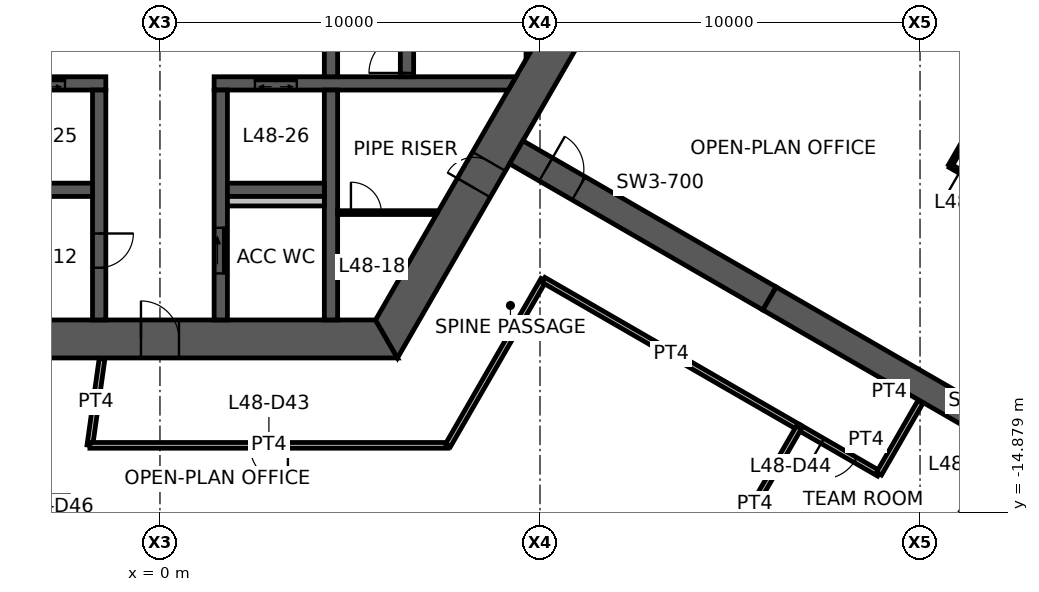
"""IFC4 building model, lengths in metres.
Left out: names, types, materials, properties, quantities, classifications, styles, units other than length and angle.
Written with IfcOpenShell. Run it as: python <this file> out.ifc"""

import sys

from ifc_helpers import new_model, si_unit, direction, frame, frame_2d, origin, place, context, subcontext, project, spatial, polyline, rectangle, outline, extrude, element, fill, save


model = new_model("IFC4")
c1 = context("Model", 3, precision=1e-05, world=origin(), true_north=direction((0.0, 1.0)))
c2 = subcontext(c1, "Body", "Model", "MODEL_VIEW")
j1 = project(units=[si_unit("LENGTHUNIT", "METRE"), si_unit("PLANEANGLEUNIT", "RADIAN")], contexts=[c1])
p1 = place(None, origin())
s1 = spatial("IfcSite", under=j1, at=p1, CompositionType="ELEMENT")
p2 = place(p1, origin())
s2 = spatial("IfcBuilding", under=s1, at=p2, CompositionType="ELEMENT")
p3 = place(p2, frame((0.0, 0.0, 191.6)))
s3 = spatial("IfcBuildingStorey", under=s2, at=p3, CompositionType="ELEMENT", Elevation=191.6)
p4 = place(p3, frame((-5.961, -10.325, 0.0), z_axis=(0.0, 0.0, 1.0), x_axis=(1.0, 0.0, 0.0)))
e1 = element("IfcWall", 1, at=p4, inside=s3, PredefinedType="SHEAR", context=c2, shape_type="SweptSolid", body=[
    extrude(outline(polyline([(-0.289, -0.5), (5.461, -0.5), (6.461, -0.5), (12.211, -0.5), (11.634, 0.5), (6.461, 0.5), (5.461, 0.5), (0.289, 0.5), (-0.289, -0.5)])), origin(), (0.0, 0.0, 1.0), 3.9),
])
p5 = place(p4, frame((5.461, 0.0, 0.0)))
e2 = element("IfcOpeningElement", 2, at=p5, cuts=e1, PredefinedType="OPENING", context=c2, shape_type="SweptSolid", body=[
    extrude(rectangle(XDim=1.0, YDim=2.1, at=frame_2d((0.5, 1.05))), frame((0.0, 0.51, 0.0), z_axis=(0.0, -1.0, 0.0), x_axis=(1.0, 0.0, 0.0)), (0.0, 0.0, 1.0), 1.02),
])
p6 = place(p3, frame((5.961, -10.325, 0.0), z_axis=(0.0, 0.0, 1.0), x_axis=(0.500004296715, 0.866022923061, 0.0)))
e3 = element("IfcWall", 3, at=p6, inside=s3, PredefinedType="SHEAR", context=c2, shape_type="SweptSolid", body=[
    extrude(outline(polyline([(-0.289, -0.5), (4.594, -0.5), (5.394, -0.5), (12.211, -0.5), (11.634, 0.5), (5.394, 0.5), (4.594, 0.5), (0.289, 0.5), (-0.289, -0.5)])), origin(), (0.0, 0.0, 1.0), 3.9),
])
p7 = place(p6, frame((4.594, 0.0, 0.0)))
e4 = element("IfcOpeningElement", 4, at=p7, cuts=e3, PredefinedType="OPENING", context=c2, shape_type="SweptSolid", body=[
    extrude(rectangle(XDim=0.8, YDim=2.1, at=frame_2d((0.4, 1.05))), frame((0.0, 0.51, 0.0), z_axis=(0.0, -1.0, 0.0), x_axis=(1.0, 0.0, 0.0)), (0.0, 0.0, 1.0), 1.02),
])
p8 = place(p3, frame((9.375, -5.413, 0.0), z_axis=(0.0, 0.0, 1.0), x_axis=(0.866032377459, -0.499987921047, 0.0)))
e5 = element("IfcWall", 5, at=p8, inside=s3, PredefinedType="SHEAR", context=c2, shape_type="SweptSolid", body=[
    extrude(rectangle(XDim=7.696, YDim=0.7, at=frame_2d((3.848, 0.0))), origin(), (0.0, 0.0, 1.0), 3.9),
])
p9 = place(p8, frame((0.9, 0.0, 0.0)))
e6 = element("IfcOpeningElement", 6, at=p9, cuts=e5, PredefinedType="OPENING", context=c2, shape_type="SweptSolid", body=[
    extrude(rectangle(XDim=1.0, YDim=2.1, at=frame_2d((0.5, 1.05))), frame((0.0, 0.36, 0.0), z_axis=(0.0, -1.0, 0.0), x_axis=(1.0, 0.0, 0.0)), (0.0, 0.0, 1.0), 0.72),
])
p10 = place(p3, frame((16.039, -9.26, 0.0), z_axis=(0.0, 0.0, 1.0), x_axis=(0.866024837091, -0.50000098154, 0.0)))
e7 = element("IfcWall", 7, at=p10, inside=s3, PredefinedType="SHEAR", context=c2, shape_type="SweptSolid", body=[
    extrude(rectangle(XDim=13.0, YDim=0.7, at=frame_2d((6.5, 0.0))), origin(), (0.0, 0.0, 1.0), 3.9),
])
p11 = place(p3, frame((-9.266, -3.6, 0.0), z_axis=(0.0, 0.0, 1.0), x_axis=(1.0, 0.0, 0.0)))
e8 = element("IfcWall", 8, at=p11, inside=s3, PredefinedType="SHEAR", context=c2, shape_type="SweptSolid", body=[
    extrude(outline(polyline([(0.101, -0.175), (3.116, -0.175), (4.417, -0.175), (5.667, -0.175), (6.767, -0.175), (7.841, -0.175), (7.841, 0.175), (6.767, 0.175), (5.667, 0.175), (4.417, 0.175), (3.116, 0.175), (-0.101, 0.175), (0.101, -0.175)])), origin(), (0.0, 0.0, 1.0), 3.9),
])
p12 = place(p11, frame((5.667, 0.0, 0.0)))
e9 = element("IfcOpeningElement", 9, at=p12, cuts=e8, PredefinedType="OPENING", context=c2, shape_type="SweptSolid", body=[
    extrude(rectangle(XDim=1.1, YDim=2.1, at=frame_2d((0.55, 1.05))), frame((0.0, 0.185, 0.0), z_axis=(0.0, -1.0, 0.0), x_axis=(1.0, 0.0, 0.0)), (0.0, 0.0, 1.0), 0.37),
])
p13 = place(p11, frame((3.116, 0.0, 0.0)))
e10 = element("IfcOpeningElement", 10, at=p13, cuts=e8, PredefinedType="OPENING", context=c2, shape_type="SweptSolid", body=[
    extrude(rectangle(XDim=1.3, YDim=2.1, at=frame_2d((0.65, 1.05))), frame((0.0, 0.185, 0.0), z_axis=(0.0, -1.0, 0.0), x_axis=(1.0, 0.0, 0.0)), (0.0, 0.0, 1.0), 0.37),
])
p14 = place(p3, frame((1.425, -3.6, 0.0), z_axis=(0.0, 0.0, 1.0), x_axis=(1.0, 0.0, 0.0)))
e11 = element("IfcWall", 11, at=p14, inside=s3, PredefinedType="SHEAR", context=c2, shape_type="SweptSolid", body=[
    extrude(outline(polyline([(0.0, -0.175), (1.075, -0.175), (2.175, -0.175), (7.74, -0.175), (7.942, 0.175), (2.175, 0.175), (1.075, 0.175), (0.0, 0.175), (0.0, -0.175)])), origin(), (0.0, 0.0, 1.0), 3.9),
])
p15 = place(p14, frame((1.075, 0.0, 0.0)))
e12 = element("IfcOpeningElement", 12, at=p15, cuts=e11, PredefinedType="OPENING", context=c2, shape_type="SweptSolid", body=[
    extrude(rectangle(XDim=1.1, YDim=2.1, at=frame_2d((0.55, 1.05))), frame((0.0, 0.185, 0.0), z_axis=(0.0, -1.0, 0.0), x_axis=(1.0, 0.0, 0.0)), (0.0, 0.0, 1.0), 0.37),
])
p16 = place(p3, frame((-1.6, -3.775, 0.0), z_axis=(0.0, 0.0, 1.0), x_axis=(0.0, -1.0, 0.0)))
e13 = element("IfcWall", 13, at=p16, inside=s3, PredefinedType="SHEAR", context=c2, shape_type="SweptSolid", body=[
    extrude(rectangle(XDim=6.05, YDim=0.35, at=frame_2d((3.025, 0.0))), origin(), (0.0, 0.0, 1.0), 3.9),
])
p17 = place(p16, frame((3.775, 0.0, 0.0)))
e14 = element("IfcOpeningElement", 14, at=p17, cuts=e13, PredefinedType="OPENING", context=c2, shape_type="SweptSolid", body=[
    extrude(rectangle(XDim=0.9, YDim=2.1, at=frame_2d((0.45, 1.05))), frame((0.0, 0.185, 0.0), z_axis=(0.0, -1.0, 0.0), x_axis=(1.0, 0.0, 0.0)), (0.0, 0.0, 1.0), 0.37),
])
p18 = place(p3, frame((1.6, -3.775, 0.0), z_axis=(0.0, 0.0, 1.0), x_axis=(0.0, -1.0, 0.0)))
e15 = element("IfcWall", 15, at=p18, inside=s3, PredefinedType="SHEAR", context=c2, shape_type="SweptSolid", body=[
    extrude(rectangle(XDim=6.05, YDim=0.35, at=frame_2d((3.025, 0.0))), origin(), (0.0, 0.0, 1.0), 3.9),
])
p19 = place(p18, frame((3.625, 0.0, 0.0)))
e16 = element("IfcOpeningElement", 16, at=p19, cuts=e15, PredefinedType="OPENING", context=c2, shape_type="SweptSolid", body=[
    extrude(rectangle(XDim=1.2, YDim=2.1, at=frame_2d((0.6, 1.05))), frame((0.0, 0.185, 0.0), z_axis=(0.0, -1.0, 0.0), x_axis=(1.0, 0.0, 0.0)), (0.0, 0.0, 1.0), 0.37),
])
p20 = place(p3, frame((4.5, -3.425, 0.0), z_axis=(0.0, 0.0, 1.0), x_axis=(0.0, 1.0, 0.0)))
e17 = element("IfcWall", 17, at=p20, inside=s3, PredefinedType="SHEAR", context=c2, shape_type="SweptSolid", body=[
    extrude(rectangle(XDim=6.85, YDim=0.35, at=frame_2d((3.425, 0.0))), origin(), (0.0, 0.0, 1.0), 3.9),
])
p21 = place(p20, frame((2.925, 0.0, 0.0)))
e18 = element("IfcOpeningElement", 18, at=p21, cuts=e17, PredefinedType="OPENING", context=c2, shape_type="SweptSolid", body=[
    extrude(rectangle(XDim=1.0, YDim=2.1, at=frame_2d((0.5, 1.05))), frame((0.0, 0.185, 0.0), z_axis=(0.0, -1.0, 0.0), x_axis=(1.0, 0.0, 0.0)), (0.0, 0.0, 1.0), 0.37),
])
p22 = place(p3, frame((6.5, -3.425, 0.0), z_axis=(0.0, 0.0, 1.0), x_axis=(0.0, 1.0, 0.0)))
e19 = element("IfcWall", 19, at=p22, inside=s3, PredefinedType="SHEAR", context=c2, shape_type="SweptSolid", body=[
    extrude(rectangle(XDim=6.85, YDim=0.35, at=frame_2d((3.425, 0.0))), origin(), (0.0, 0.0, 1.0), 3.9),
])
p23 = place(p22, frame((0.1, 0.0, 0.0)))
e20 = element("IfcOpeningElement", 20, at=p23, cuts=e19, PredefinedType="OPENING", context=c2, shape_type="SweptSolid", body=[
    extrude(rectangle(XDim=1.0, YDim=2.1, at=frame_2d((0.5, 1.05))), frame((0.0, 0.185, 0.0), z_axis=(0.0, -1.0, 0.0), x_axis=(1.0, 0.0, 0.0)), (0.0, 0.0, 1.0), 0.37),
])
p24 = place(p3, frame((4.5, -3.775, 0.0), z_axis=(0.0, 0.0, 1.0), x_axis=(0.0, -1.0, 0.0)))
e21 = element("IfcWall", 21, at=p24, inside=s3, PredefinedType="SHEAR", context=c2, shape_type="SweptSolid", body=[
    extrude(rectangle(XDim=6.05, YDim=0.35, at=frame_2d((3.025, 0.0))), origin(), (0.0, 0.0, 1.0), 3.9),
])
for number, where, z_axis, x_axis in (
    (22, (-4.325, -6.4, 0.0), (0.0, 0.0, 1.0), (1.0, 0.0, 0.0)),
    (23, (1.775, -6.4, 0.0), (0.0, 0.0, 1.0), (1.0, 0.0, 0.0)),
):
    element("IfcWall", number, at=place(p3, frame(where, z_axis=z_axis, x_axis=x_axis)), inside=s3, PredefinedType="SHEAR", context=c2, shape_type="SweptSolid", body=[
        extrude(rectangle(XDim=2.55, YDim=0.35, at=frame_2d((1.275, 0.0))), origin(), (0.0, 0.0, 1.0), 3.9),
    ])
p25 = place(p3, frame((9.808, -2.662, 0.0), z_axis=(0.0, 0.0, 1.0), x_axis=(0.0, 1.0, 0.0)))
e24 = element("IfcWall", 24, at=p25, inside=s3, PredefinedType="SHEAR", context=c2, shape_type="SweptSolid", body=[
    extrude(outline(polyline([(0.303, -0.175), (5.021, -0.175), (5.628, 0.175), (-0.303, 0.175), (0.303, -0.175)])), origin(), (0.0, 0.0, 1.0), 3.9),
])
p26 = place(p3, frame((1.775, -6.7, 0.0), z_axis=(0.0, 0.0, 1.0), x_axis=(1.0, 0.0, 0.0)))
e25 = element("IfcWall", 25, at=p26, inside=s3, PredefinedType="PLUMBINGWALL", context=c2, shape_type="SweptSolid", body=[
    extrude(rectangle(XDim=2.55, YDim=0.25, at=frame_2d((1.275, 0.0))), origin(), (0.0, 0.0, 1.0), 3.9),
])
p27 = place(p3, frame((4.675, -7.0, 0.0), z_axis=(0.0, 0.0, 1.0), x_axis=(1.0, 0.0, 0.0)))
e26 = element("IfcWall", 26, at=p27, inside=s3, PredefinedType="PARTITIONING", context=c2, shape_type="SweptSolid", body=[
    extrude(outline(polyline([(0.0, -0.05), (0.35, -0.05), (1.15, -0.05), (2.6, -0.05), (2.628, 0.0), (2.634, 0.05), (1.15, 0.05), (0.35, 0.05), (0.0, 0.05), (0.0, -0.05)])), origin(), (0.0, 0.0, 1.0), 2.95),
])
p28 = place(p27, frame((0.35, 0.0, 0.0)))
e27 = element("IfcOpeningElement", 27, at=p28, cuts=e26, PredefinedType="OPENING", context=c2, shape_type="SweptSolid", body=[
    extrude(rectangle(XDim=0.8, YDim=2.1, at=frame_2d((0.4, 1.05))), frame((0.0, 0.06, 0.0), z_axis=(0.0, -1.0, 0.0), x_axis=(1.0, 0.0, 0.0)), (0.0, 0.0, 1.0), 0.12),
])
p29 = place(p3, frame((20.792, -5.769, 0.0), z_axis=(0.0, 0.0, 1.0), x_axis=(0.500005339912, 0.866022320763, 0.0)))
e28 = element("IfcWall", 28, at=p29, inside=s3, PredefinedType="PARTITIONING", context=c2, shape_type="SweptSolid", body=[
    extrude(rectangle(XDim=5.08, YDim=0.1, at=frame_2d((2.54, 0.0))), origin(), (0.0, 0.0, 1.0), 2.95),
])
p30 = place(p3, frame((26.527, -9.075, 0.0), z_axis=(0.0, 0.0, 1.0), x_axis=(-0.866343956507, 0.499447844147, 0.0)))
e29 = element("IfcWall", 29, at=p30, inside=s3, PredefinedType="PARTITIONING", context=c2, shape_type="SweptSolid", body=[
    extrude(rectangle(XDim=6.62, YDim=0.1, at=frame_2d((3.31, 0.0))), origin(), (0.0, 0.0, 1.0), 2.95),
])
p31 = place(p30, frame((5.42, 0.0, 0.0)))
e30 = element("IfcOpeningElement", 30, at=p31, cuts=e29, PredefinedType="OPENING", context=c2, shape_type="SweptSolid", body=[
    extrude(rectangle(XDim=0.9, YDim=2.1, at=frame_2d((0.45, 1.05))), frame((0.0, 0.06, 0.0), z_axis=(0.0, -1.0, 0.0), x_axis=(1.0, 0.0, 0.0)), (0.0, 0.0, 1.0), 0.12),
])
p32 = place(p3, frame((-1.844, -13.125, 0.0), z_axis=(0.0, 0.0, 1.0), x_axis=(0.139119980631, 0.990275532864, 0.0)))
e31 = element("IfcWall", 31, at=p32, inside=s3, PredefinedType="PARTITIONING", context=c2, shape_type="SweptSolid", body=[
    extrude(rectangle(XDim=2.302, YDim=0.15, at=frame_2d((1.151, 0.0))), origin(), (0.0, 0.0, 1.0), 2.95),
])
p33 = place(p3, frame((7.578, -13.125, 0.0), z_axis=(0.0, 0.0, 1.0), x_axis=(-1.0, 0.0, 0.0)))
e32 = element("IfcWall", 32, at=p33, inside=s3, PredefinedType="PARTITIONING", context=c2, shape_type="SweptSolid", body=[
    extrude(rectangle(XDim=9.422, YDim=0.15, at=frame_2d((4.711, 0.0))), origin(), (0.0, 0.0, 1.0), 2.95),
])
p34 = place(p33, frame((4.211, 0.0, 0.0)))
e33 = element("IfcOpeningElement", 33, at=p34, cuts=e32, PredefinedType="OPENING", context=c2, shape_type="SweptSolid", body=[
    extrude(rectangle(XDim=1.0, YDim=2.1, at=frame_2d((0.5, 1.05))), frame((0.0, 0.085, 0.0), z_axis=(0.0, -1.0, 0.0), x_axis=(1.0, 0.0, 0.0)), (0.0, 0.0, 1.0), 0.17),
])
p35 = place(p3, frame((10.092, -8.771, 0.0), z_axis=(0.0, 0.0, 1.0), x_axis=(-0.500019495363, -0.866014147839, 0.0)))
e34 = element("IfcWall", 34, at=p35, inside=s3, PredefinedType="PARTITIONING", context=c2, shape_type="SweptSolid", body=[
    extrude(rectangle(XDim=5.028, YDim=0.15, at=frame_2d((2.514, 0.0))), origin(), (0.0, 0.0, 1.0), 2.95),
])
p36 = place(p3, frame((16.822, -12.656, 0.0), z_axis=(0.0, 0.0, 1.0), x_axis=(-0.866028634939, 0.499994403434, 0.0)))
e35 = element("IfcWall", 35, at=p36, inside=s3, PredefinedType="PARTITIONING", context=c2, shape_type="SweptSolid", body=[
    extrude(rectangle(XDim=7.771, YDim=0.15, at=frame_2d((3.885, 0.0))), origin(), (0.0, 0.0, 1.0), 2.95),
])
p37 = place(p3, frame((18.921, -13.869, 0.0), z_axis=(0.0, 0.0, 1.0), x_axis=(-0.866000196749, 0.500043657324, 0.0)))
e36 = element("IfcWall", 36, at=p37, inside=s3, PredefinedType="PARTITIONING", context=c2, shape_type="SweptSolid", body=[
    extrude(rectangle(XDim=2.434, YDim=0.15, at=frame_2d((1.217, 0.0))), origin(), (0.0, 0.0, 1.0), 2.95),
])
p38 = place(p37, frame((0.717, 0.0, 0.0)))
e37 = element("IfcOpeningElement", 37, at=p38, cuts=e36, PredefinedType="OPENING", context=c2, shape_type="SweptSolid", body=[
    extrude(rectangle(XDim=1.0, YDim=2.1, at=frame_2d((0.5, 1.05))), frame((0.0, 0.085, 0.0), z_axis=(0.0, -1.0, 0.0), x_axis=(1.0, 0.0, 0.0)), (0.0, 0.0, 1.0), 0.17),
])
p39 = place(p3, frame((20.011, -11.981, 0.0), z_axis=(0.0, 0.0, 1.0), x_axis=(-0.500029427677, -0.866008413041, 0.0)))
e38 = element("IfcWall", 38, at=p39, inside=s3, PredefinedType="PARTITIONING", context=c2, shape_type="SweptSolid", body=[
    extrude(rectangle(XDim=2.18, YDim=0.15, at=frame_2d((1.09, 0.0))), origin(), (0.0, 0.0, 1.0), 2.95),
])
p40 = place(p3, frame((18.678, -19.097, 0.0), z_axis=(0.0, 0.0, 1.0), x_axis=(0.499488276661, 0.86632064588, 0.0)))
e39 = element("IfcWall", 39, at=p40, inside=s3, PredefinedType="PARTITIONING", context=c2, shape_type="SweptSolid", body=[
    extrude(rectangle(XDim=6.83, YDim=0.1, at=frame_2d((3.415, 0.0))), origin(), (0.0, 0.0, 1.0), 2.95),
])
p41 = place(p40, frame((5.63, 0.0, 0.0)))
e40 = element("IfcOpeningElement", 40, at=p41, cuts=e39, PredefinedType="OPENING", context=c2, shape_type="SweptSolid", body=[
    extrude(rectangle(XDim=0.9, YDim=2.1, at=frame_2d((0.45, 1.05))), frame((0.0, 0.06, 0.0), z_axis=(0.0, -1.0, 0.0), x_axis=(1.0, 0.0, 0.0)), (0.0, 0.0, 1.0), 0.12),
])
p42 = place(p3, frame((16.812, -12.652, 0.0), z_axis=(0.0, 0.0, 1.0), x_axis=(-0.499085020987, -0.86655302309, 0.0)))
e41 = element("IfcWall", 41, at=p42, inside=s3, PredefinedType="PARTITIONING", context=c2, shape_type="SweptSolid", body=[
    extrude(rectangle(XDim=4.654, YDim=0.15, at=frame_2d((2.327, 0.0))), origin(), (0.0, 0.0, 1.0), 2.95),
])
p43 = place(p5, origin())
e42 = element("IfcDoor", 42, at=p43, inside=s3, OperationType="SINGLE_SWING_LEFT", PredefinedType="DOOR", context=c2, shape_type="SweptSolid", body=[
    extrude(rectangle(XDim=1.0, YDim=2.1, at=frame_2d((0.5, 1.05))), frame((0.0, 0.025, 0.0), z_axis=(0.0, -1.0, 0.0), x_axis=(1.0, 0.0, 0.0)), (0.0, 0.0, 1.0), 0.05),
])
fill(e2, e42)
p44 = place(p7, origin())
e43 = element("IfcDoor", 43, at=p44, inside=s3, OperationType="SINGLE_SWING_LEFT", PredefinedType="DOOR", context=c2, shape_type="SweptSolid", body=[
    extrude(rectangle(XDim=0.8, YDim=2.1, at=frame_2d((0.4, 1.05))), frame((0.0, 0.025, 0.0), z_axis=(0.0, -1.0, 0.0), x_axis=(1.0, 0.0, 0.0)), (0.0, 0.0, 1.0), 0.05),
])
fill(e4, e43)
p45 = place(p23, origin())
e44 = element("IfcDoor", 44, at=p45, inside=s3, OperationType="SINGLE_SWING_LEFT", PredefinedType="DOOR", context=c2, shape_type="SweptSolid", body=[
    extrude(rectangle(XDim=1.0, YDim=2.1, at=frame_2d((0.5, 1.05))), frame((0.0, 0.025, 0.0), z_axis=(0.0, -1.0, 0.0), x_axis=(1.0, 0.0, 0.0)), (0.0, 0.0, 1.0), 0.05),
])
fill(e20, e44)
p46 = place(p19, origin())
e45 = element("IfcDoor", 45, at=p46, inside=s3, OperationType="SLIDING_TO_LEFT", PredefinedType="DOOR", context=c2, shape_type="SweptSolid", body=[
    extrude(rectangle(XDim=1.2, YDim=2.1, at=frame_2d((0.6, 1.05))), frame((0.0, 0.025, 0.0), z_axis=(0.0, -1.0, 0.0), x_axis=(1.0, 0.0, 0.0)), (0.0, 0.0, 1.0), 0.05),
])
fill(e16, e45)
p47 = place(p17, origin())
e46 = element("IfcDoor", 46, at=p47, inside=s3, OperationType="SINGLE_SWING_LEFT", PredefinedType="DOOR", context=c2, shape_type="SweptSolid", body=[
    extrude(rectangle(XDim=0.9, YDim=2.1, at=frame_2d((0.45, 1.05))), frame((0.0, 0.025, 0.0), z_axis=(0.0, -1.0, 0.0), x_axis=(1.0, 0.0, 0.0)), (0.0, 0.0, 1.0), 0.05),
])
fill(e14, e46)
p48 = place(p9, origin())
e47 = element("IfcDoor", 47, at=p48, inside=s3, OperationType="SINGLE_SWING_LEFT", PredefinedType="DOOR", context=c2, shape_type="SweptSolid", body=[
    extrude(rectangle(XDim=1.0, YDim=2.1, at=frame_2d((0.5, 1.05))), frame((0.0, 0.025, 0.0), z_axis=(0.0, -1.0, 0.0), x_axis=(1.0, 0.0, 0.0)), (0.0, 0.0, 1.0), 0.05),
])
fill(e6, e47)
p49 = place(p28, origin())
e48 = element("IfcDoor", 48, at=p49, inside=s3, OperationType="SINGLE_SWING_LEFT", PredefinedType="DOOR", context=c2, shape_type="SweptSolid", body=[
    extrude(rectangle(XDim=0.8, YDim=2.1, at=frame_2d((0.4, 1.05))), frame((0.0, 0.025, 0.0), z_axis=(0.0, -1.0, 0.0), x_axis=(1.0, 0.0, 0.0)), (0.0, 0.0, 1.0), 0.05),
])
fill(e27, e48)
p50 = place(p34, origin())
e49 = element("IfcDoor", 49, at=p50, inside=s3, OperationType="SINGLE_SWING_LEFT", PredefinedType="DOOR", context=c2, shape_type="SweptSolid", body=[
    extrude(rectangle(XDim=1.0, YDim=2.1, at=frame_2d((0.5, 1.05))), frame((0.0, 0.025, 0.0), z_axis=(0.0, -1.0, 0.0), x_axis=(1.0, 0.0, 0.0)), (0.0, 0.0, 1.0), 0.05),
])
fill(e33, e49)
p51 = place(p38, origin())
e50 = element("IfcDoor", 50, at=p51, inside=s3, OperationType="SINGLE_SWING_RIGHT", PredefinedType="DOOR", context=c2, shape_type="SweptSolid", body=[
    extrude(rectangle(XDim=1.0, YDim=2.1, at=frame_2d((0.5, 1.05))), frame((0.0, 0.025, 0.0), z_axis=(0.0, -1.0, 0.0), x_axis=(1.0, 0.0, 0.0)), (0.0, 0.0, 1.0), 0.05),
])
fill(e37, e50)
p52 = place(p15, origin())
e51 = element("IfcDoor", 51, at=p52, inside=s3, OperationType="DOUBLE_DOOR_SLIDING", PredefinedType="DOOR", context=c2, shape_type="SweptSolid", body=[
    extrude(rectangle(XDim=1.1, YDim=2.1, at=frame_2d((0.55, 1.05))), frame((0.0, 0.025, 0.0), z_axis=(0.0, -1.0, 0.0), x_axis=(1.0, 0.0, 0.0)), (0.0, 0.0, 1.0), 0.05),
])
fill(e12, e51)
p53 = place(p12, origin())
e52 = element("IfcDoor", 52, at=p53, inside=s3, OperationType="DOUBLE_DOOR_SLIDING", PredefinedType="DOOR", context=c2, shape_type="SweptSolid", body=[
    extrude(rectangle(XDim=1.1, YDim=2.1, at=frame_2d((0.55, 1.05))), frame((0.0, 0.025, 0.0), z_axis=(0.0, -1.0, 0.0), x_axis=(1.0, 0.0, 0.0)), (0.0, 0.0, 1.0), 0.05),
])
fill(e9, e52)
save(model, sys.argv[1])
